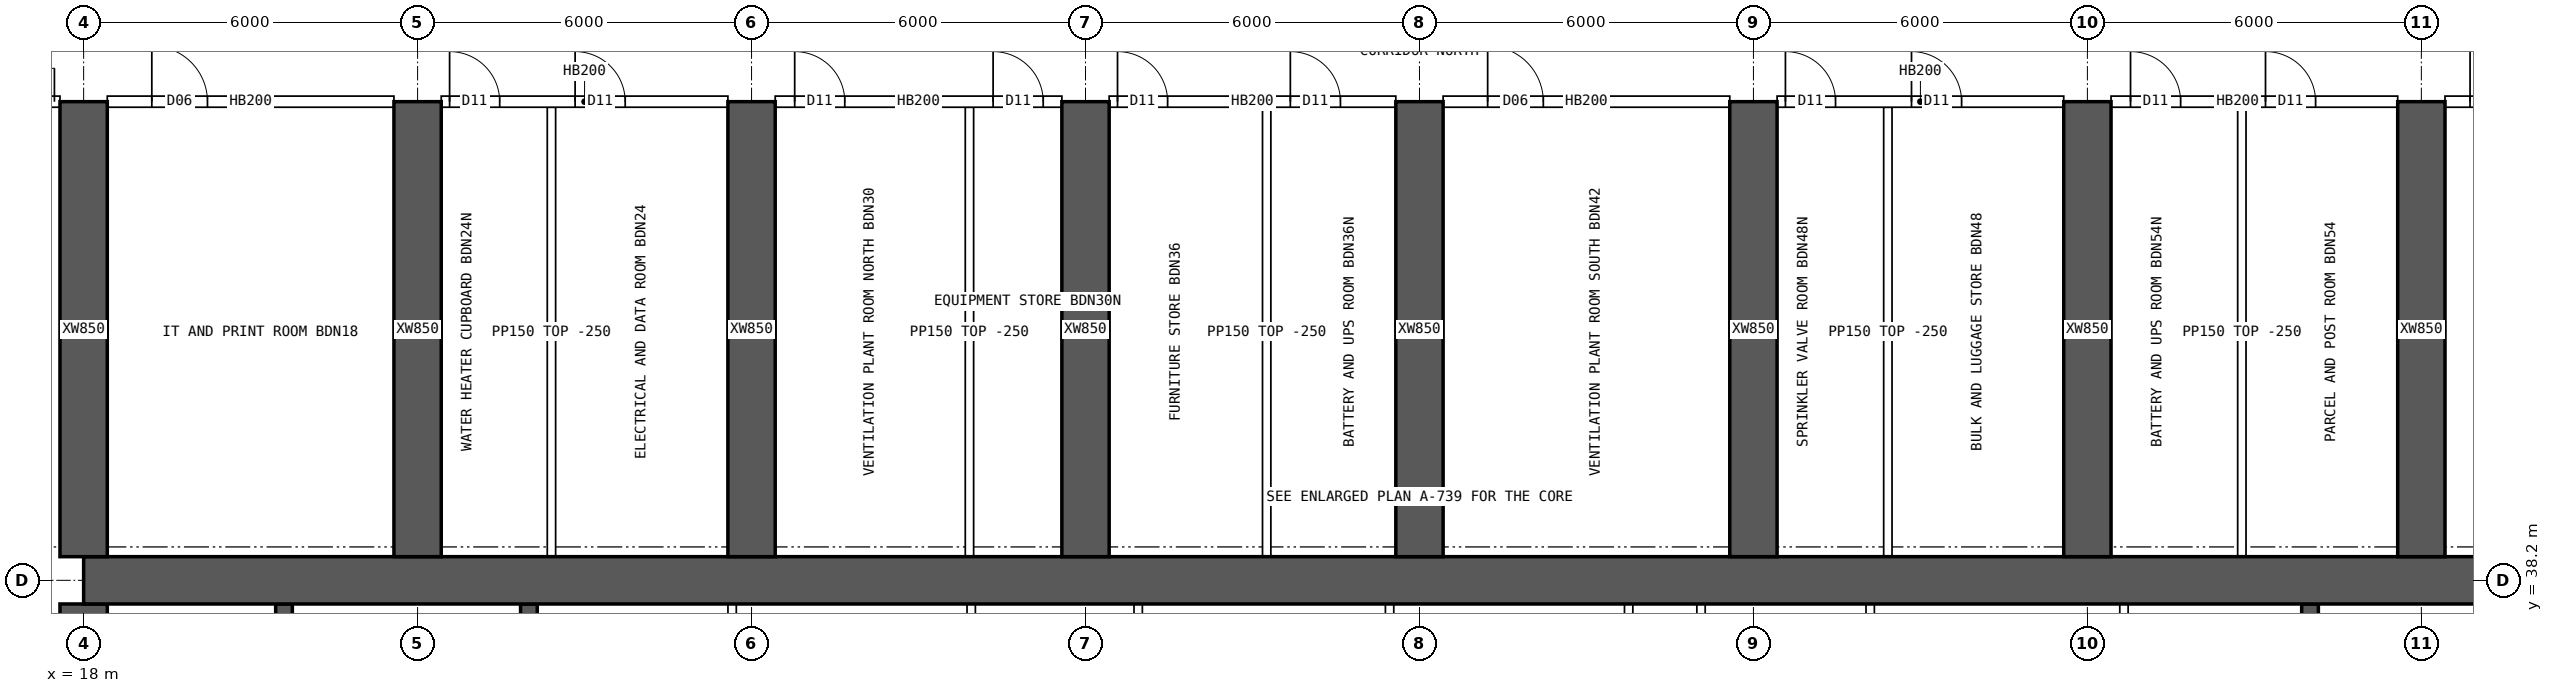
"""IFC4 building model, lengths in metres.
Left out: names, types, materials, properties, quantities, classifications, styles, units other than length and angle.
Written with IfcOpenShell. Run it as: python <this file> out.ifc"""

import sys

from ifc_helpers import new_model, si_unit, direction, frame, frame_2d, origin, place, context, subcontext, project, spatial, rectangle, extrude, element, fill, save


model = new_model("IFC4")
c1 = context("Model", 3, precision=1e-05, world=origin(), true_north=direction((0.0, 1.0)))
c2 = subcontext(c1, "Body", "Model", "MODEL_VIEW")
j1 = project(units=[si_unit("LENGTHUNIT", "METRE"), si_unit("PLANEANGLEUNIT", "RADIAN")], contexts=[c1])
p1 = place(None, origin())
s1 = spatial("IfcSite", under=j1, at=p1, CompositionType="ELEMENT")
p2 = place(p1, origin())
s2 = spatial("IfcBuilding", under=s1, at=p2, CompositionType="ELEMENT")
p3 = place(p2, frame((0.0, 0.0, 148.6)))
s3 = spatial("IfcBuildingStorey", under=s2, at=p3, CompositionType="ELEMENT", Elevation=148.6)
p4 = place(p3, frame((18.0, 38.2, 0.0), z_axis=(0.0, 0.0, 1.0), x_axis=(1.0, 0.0, 0.0)))
e1 = element("IfcWall", 1, at=p4, inside=s3, PredefinedType="SHEAR", context=c2, shape_type="SweptSolid", body=[
    extrude(rectangle(XDim=48.0, YDim=0.85, at=frame_2d((24.0, 0.0))), origin(), (0.0, 0.0, 1.0), 3.75),
])
p5 = place(p3, frame((18.0, 26.225, 0.0), z_axis=(0.0, 0.0, 1.0), x_axis=(0.0, 1.0, 0.0)))
e2 = element("IfcWall", 2, at=p5, inside=s3, PredefinedType="SHEAR", context=c2, shape_type="SweptSolid", body=[
    extrude(rectangle(XDim=11.55, YDim=0.85, at=frame_2d((5.775, 0.0))), origin(), (0.0, 0.0, 1.0), 3.75),
])
p6 = place(p5, frame((5.075, 0.0, 0.0)))
e3 = element("IfcOpeningElement", 3, at=p6, cuts=e2, PredefinedType="OPENING", context=c2, shape_type="SweptSolid", body=[
    extrude(rectangle(XDim=1.2, YDim=2.1, at=frame_2d((0.6, 1.05))), frame((0.0, 0.435, 0.0), z_axis=(0.0, -1.0, 0.0), x_axis=(1.0, 0.0, 0.0)), (0.0, 0.0, 1.0), 0.87),
])
for number, where, z_axis, x_axis in (
    (4, (21.6, 34.75, 0.0), (0.0, 0.0, 1.0), (0.0, 1.0, 0.0)),
    (5, (26.0, 34.75, 0.0), (0.0, 0.0, 1.0), (0.0, 1.0, 0.0)),
    (6, (58.0, 34.75, 0.0), (0.0, 0.0, 1.0), (0.0, 1.0, 0.0)),
):
    element("IfcWall", number, at=place(p3, frame(where, z_axis=z_axis, x_axis=x_axis)), inside=s3, PredefinedType="SHEAR", context=c2, shape_type="SweptSolid", body=[
        extrude(rectangle(XDim=3.025, YDim=0.3, at=frame_2d((1.512, 0.0))), origin(), (0.0, 0.0, 1.0), 3.75),
    ])
for number, where, z_axis, x_axis in (
    (7, (18.0, 38.625, 0.0), (0.0, 0.0, 1.0), (0.0, 1.0, 0.0)),
    (8, (24.0, 38.625, 0.0), (0.0, 0.0, 1.0), (0.0, 1.0, 0.0)),
    (9, (30.0, 38.625, 0.0), (0.0, 0.0, 1.0), (0.0, 1.0, 0.0)),
    (10, (36.0, 38.625, 0.0), (0.0, 0.0, 1.0), (0.0, 1.0, 0.0)),
    (11, (42.0, 38.625, 0.0), (0.0, 0.0, 1.0), (0.0, 1.0, 0.0)),
    (12, (48.0, 38.625, 0.0), (0.0, 0.0, 1.0), (0.0, 1.0, 0.0)),
    (13, (54.0, 38.625, 0.0), (0.0, 0.0, 1.0), (0.0, 1.0, 0.0)),
    (14, (60.0, 38.625, 0.0), (0.0, 0.0, 1.0), (0.0, 1.0, 0.0)),
):
    element("IfcWall", number, at=place(p3, frame(where, z_axis=z_axis, x_axis=x_axis)), inside=s3, PredefinedType="SHEAR", context=c2, shape_type="SweptSolid", body=[
        extrude(rectangle(XDim=8.175, YDim=0.85, at=frame_2d((4.087, 0.0))), origin(), (0.0, 0.0, 1.0), 3.75),
    ])
for number, where, z_axis, x_axis in (
    (15, (29.651, 34.75, 0.0), (0.0, 0.0, 1.0), (0.0, 1.0, 0.0)),
    (16, (33.946, 34.75, 0.0), (0.0, 0.0, 1.0), (0.0, 1.0, 0.0)),
    (17, (36.946, 34.75, 0.0), (0.0, 0.0, 1.0), (0.0, 1.0, 0.0)),
    (18, (41.463, 34.75, 0.0), (0.0, 0.0, 1.0), (0.0, 1.0, 0.0)),
    (19, (45.758, 34.75, 0.0), (0.0, 0.0, 1.0), (0.0, 1.0, 0.0)),
    (20, (47.058, 34.75, 0.0), (0.0, 0.0, 1.0), (0.0, 1.0, 0.0)),
    (21, (50.098, 34.75, 0.0), (0.0, 0.0, 1.0), (0.0, 1.0, 0.0)),
    (22, (54.657, 34.75, 0.0), (0.0, 0.0, 1.0), (0.0, 1.0, 0.0)),
):
    element("IfcWall", number, at=place(p3, frame(where, z_axis=z_axis, x_axis=x_axis)), inside=s3, PredefinedType="SOLIDWALL", context=c2, shape_type="SweptSolid", body=[
        extrude(rectangle(XDim=3.025, YDim=0.15, at=frame_2d((1.512, 0.0))), origin(), (0.0, 0.0, 1.0), 3.5),
    ])
p7 = place(p3, frame((15.6, 46.8, 0.0), z_axis=(0.0, 0.0, 1.0), x_axis=(1.0, 0.0, 0.0)))
e23 = element("IfcWall", 23, at=p7, inside=s3, PredefinedType="SOLIDWALL", context=c2, shape_type="SweptSolid", body=[
    extrude(rectangle(XDim=1.975, YDim=0.2, at=frame_2d((0.987, 0.0))), origin(), (0.0, 0.0, 1.0), 3.5),
])
p8 = place(p7, frame((0.675, 0.0, 0.0)))
e24 = element("IfcOpeningElement", 24, at=p8, cuts=e23, PredefinedType="OPENING", context=c2, shape_type="SweptSolid", body=[
    extrude(rectangle(XDim=1.2, YDim=2.1, at=frame_2d((0.6, 1.05))), frame((0.0, 0.11, 0.0), z_axis=(0.0, -1.0, 0.0), x_axis=(1.0, 0.0, 0.0)), (0.0, 0.0, 1.0), 0.22),
])
p9 = place(p3, frame((18.425, 46.8, 0.0), z_axis=(0.0, 0.0, 1.0), x_axis=(1.0, 0.0, 0.0)))
e25 = element("IfcWall", 25, at=p9, inside=s3, PredefinedType="SOLIDWALL", context=c2, shape_type="SweptSolid", body=[
    extrude(rectangle(XDim=5.15, YDim=0.2, at=frame_2d((2.575, 0.0))), origin(), (0.0, 0.0, 1.0), 3.5),
])
p10 = place(p9, frame((0.8, 0.0, 0.0)))
e26 = element("IfcOpeningElement", 26, at=p10, cuts=e25, PredefinedType="OPENING", context=c2, shape_type="SweptSolid", body=[
    extrude(rectangle(XDim=1.0, YDim=2.1, at=frame_2d((0.5, 1.05))), frame((0.0, 0.11, 0.0), z_axis=(0.0, -1.0, 0.0), x_axis=(1.0, 0.0, 0.0)), (0.0, 0.0, 1.0), 0.22),
])
p11 = place(p3, frame((24.425, 46.8, 0.0), z_axis=(0.0, 0.0, 1.0), x_axis=(1.0, 0.0, 0.0)))
e27 = element("IfcWall", 27, at=p11, inside=s3, PredefinedType="SOLIDWALL", context=c2, shape_type="SweptSolid", body=[
    extrude(rectangle(XDim=5.15, YDim=0.2, at=frame_2d((2.575, 0.0))), origin(), (0.0, 0.0, 1.0), 3.5),
])
p12 = place(p11, frame((0.15, 0.0, 0.0)))
e28 = element("IfcOpeningElement", 28, at=p12, cuts=e27, PredefinedType="OPENING", context=c2, shape_type="SweptSolid", body=[
    extrude(rectangle(XDim=0.9, YDim=2.1, at=frame_2d((0.45, 1.05))), frame((0.0, 0.11, 0.0), z_axis=(0.0, -1.0, 0.0), x_axis=(1.0, 0.0, 0.0)), (0.0, 0.0, 1.0), 0.22),
])
p13 = place(p11, frame((2.405, 0.0, 0.0)))
e29 = element("IfcOpeningElement", 29, at=p13, cuts=e27, PredefinedType="OPENING", context=c2, shape_type="SweptSolid", body=[
    extrude(rectangle(XDim=0.9, YDim=2.1, at=frame_2d((0.45, 1.05))), frame((0.0, 0.11, 0.0), z_axis=(0.0, -1.0, 0.0), x_axis=(1.0, 0.0, 0.0)), (0.0, 0.0, 1.0), 0.22),
])
p14 = place(p3, frame((30.425, 46.8, 0.0), z_axis=(0.0, 0.0, 1.0), x_axis=(1.0, 0.0, 0.0)))
e30 = element("IfcWall", 30, at=p14, inside=s3, PredefinedType="SOLIDWALL", context=c2, shape_type="SweptSolid", body=[
    extrude(rectangle(XDim=5.15, YDim=0.2, at=frame_2d((2.575, 0.0))), origin(), (0.0, 0.0, 1.0), 3.5),
])
p15 = place(p14, frame((0.35, 0.0, 0.0)))
e31 = element("IfcOpeningElement", 31, at=p15, cuts=e30, PredefinedType="OPENING", context=c2, shape_type="SweptSolid", body=[
    extrude(rectangle(XDim=0.9, YDim=2.1, at=frame_2d((0.45, 1.05))), frame((0.0, 0.11, 0.0), z_axis=(0.0, -1.0, 0.0), x_axis=(1.0, 0.0, 0.0)), (0.0, 0.0, 1.0), 0.22),
])
p16 = place(p14, frame((3.915, 0.0, 0.0)))
e32 = element("IfcOpeningElement", 32, at=p16, cuts=e30, PredefinedType="OPENING", context=c2, shape_type="SweptSolid", body=[
    extrude(rectangle(XDim=0.9, YDim=2.1, at=frame_2d((0.45, 1.05))), frame((0.0, 0.11, 0.0), z_axis=(0.0, -1.0, 0.0), x_axis=(1.0, 0.0, 0.0)), (0.0, 0.0, 1.0), 0.22),
])
p17 = place(p3, frame((36.425, 46.8, 0.0), z_axis=(0.0, 0.0, 1.0), x_axis=(1.0, 0.0, 0.0)))
e33 = element("IfcWall", 33, at=p17, inside=s3, PredefinedType="SOLIDWALL", context=c2, shape_type="SweptSolid", body=[
    extrude(rectangle(XDim=5.15, YDim=0.2, at=frame_2d((2.575, 0.0))), origin(), (0.0, 0.0, 1.0), 3.5),
])
p18 = place(p17, frame((0.15, 0.0, 0.0)))
e34 = element("IfcOpeningElement", 34, at=p18, cuts=e33, PredefinedType="OPENING", context=c2, shape_type="SweptSolid", body=[
    extrude(rectangle(XDim=0.9, YDim=2.1, at=frame_2d((0.45, 1.05))), frame((0.0, 0.11, 0.0), z_axis=(0.0, -1.0, 0.0), x_axis=(1.0, 0.0, 0.0)), (0.0, 0.0, 1.0), 0.22),
])
p19 = place(p17, frame((3.255, 0.0, 0.0)))
e35 = element("IfcOpeningElement", 35, at=p19, cuts=e33, PredefinedType="OPENING", context=c2, shape_type="SweptSolid", body=[
    extrude(rectangle(XDim=0.9, YDim=2.1, at=frame_2d((0.45, 1.05))), frame((0.0, 0.11, 0.0), z_axis=(0.0, -1.0, 0.0), x_axis=(1.0, 0.0, 0.0)), (0.0, 0.0, 1.0), 0.22),
])
p20 = place(p3, frame((42.425, 46.8, 0.0), z_axis=(0.0, 0.0, 1.0), x_axis=(1.0, 0.0, 0.0)))
e36 = element("IfcWall", 36, at=p20, inside=s3, PredefinedType="SOLIDWALL", context=c2, shape_type="SweptSolid", body=[
    extrude(rectangle(XDim=5.15, YDim=0.2, at=frame_2d((2.575, 0.0))), origin(), (0.0, 0.0, 1.0), 3.5),
])
p21 = place(p20, frame((0.8, 0.0, 0.0)))
e37 = element("IfcOpeningElement", 37, at=p21, cuts=e36, PredefinedType="OPENING", context=c2, shape_type="SweptSolid", body=[
    extrude(rectangle(XDim=1.0, YDim=2.1, at=frame_2d((0.5, 1.05))), frame((0.0, 0.11, 0.0), z_axis=(0.0, -1.0, 0.0), x_axis=(1.0, 0.0, 0.0)), (0.0, 0.0, 1.0), 0.22),
])
p22 = place(p3, frame((48.425, 46.8, 0.0), z_axis=(0.0, 0.0, 1.0), x_axis=(1.0, 0.0, 0.0)))
e38 = element("IfcWall", 38, at=p22, inside=s3, PredefinedType="SOLIDWALL", context=c2, shape_type="SweptSolid", body=[
    extrude(rectangle(XDim=5.15, YDim=0.2, at=frame_2d((2.575, 0.0))), origin(), (0.0, 0.0, 1.0), 3.5),
])
p23 = place(p22, frame((0.15, 0.0, 0.0)))
e39 = element("IfcOpeningElement", 39, at=p23, cuts=e38, PredefinedType="OPENING", context=c2, shape_type="SweptSolid", body=[
    extrude(rectangle(XDim=0.9, YDim=2.1, at=frame_2d((0.45, 1.05))), frame((0.0, 0.11, 0.0), z_axis=(0.0, -1.0, 0.0), x_axis=(1.0, 0.0, 0.0)), (0.0, 0.0, 1.0), 0.22),
])
p24 = place(p22, frame((2.415, 0.0, 0.0)))
e40 = element("IfcOpeningElement", 40, at=p24, cuts=e38, PredefinedType="OPENING", context=c2, shape_type="SweptSolid", body=[
    extrude(rectangle(XDim=0.9, YDim=2.1, at=frame_2d((0.45, 1.05))), frame((0.0, 0.11, 0.0), z_axis=(0.0, -1.0, 0.0), x_axis=(1.0, 0.0, 0.0)), (0.0, 0.0, 1.0), 0.22),
])
p25 = place(p3, frame((54.425, 46.8, 0.0), z_axis=(0.0, 0.0, 1.0), x_axis=(1.0, 0.0, 0.0)))
e41 = element("IfcWall", 41, at=p25, inside=s3, PredefinedType="SOLIDWALL", context=c2, shape_type="SweptSolid", body=[
    extrude(rectangle(XDim=5.15, YDim=0.2, at=frame_2d((2.575, 0.0))), origin(), (0.0, 0.0, 1.0), 3.5),
])
p26 = place(p25, frame((0.35, 0.0, 0.0)))
e42 = element("IfcOpeningElement", 42, at=p26, cuts=e41, PredefinedType="OPENING", context=c2, shape_type="SweptSolid", body=[
    extrude(rectangle(XDim=0.9, YDim=2.1, at=frame_2d((0.45, 1.05))), frame((0.0, 0.11, 0.0), z_axis=(0.0, -1.0, 0.0), x_axis=(1.0, 0.0, 0.0)), (0.0, 0.0, 1.0), 0.22),
])
p27 = place(p25, frame((2.775, 0.0, 0.0)))
e43 = element("IfcOpeningElement", 43, at=p27, cuts=e41, PredefinedType="OPENING", context=c2, shape_type="SweptSolid", body=[
    extrude(rectangle(XDim=0.9, YDim=2.1, at=frame_2d((0.45, 1.05))), frame((0.0, 0.11, 0.0), z_axis=(0.0, -1.0, 0.0), x_axis=(1.0, 0.0, 0.0)), (0.0, 0.0, 1.0), 0.22),
])
p28 = place(p3, frame((60.425, 46.8, 0.0), z_axis=(0.0, 0.0, 1.0), x_axis=(1.0, 0.0, 0.0)))
e44 = element("IfcWall", 44, at=p28, inside=s3, PredefinedType="SOLIDWALL", context=c2, shape_type="SweptSolid", body=[
    extrude(rectangle(XDim=5.15, YDim=0.2, at=frame_2d((2.575, 0.0))), origin(), (0.0, 0.0, 1.0), 3.5),
])
p29 = place(p28, frame((0.45, 0.0, 0.0)))
e45 = element("IfcOpeningElement", 45, at=p29, cuts=e44, PredefinedType="OPENING", context=c2, shape_type="SweptSolid", body=[
    extrude(rectangle(XDim=1.0, YDim=2.1, at=frame_2d((0.5, 1.05))), frame((0.0, 0.11, 0.0), z_axis=(0.0, -1.0, 0.0), x_axis=(1.0, 0.0, 0.0)), (0.0, 0.0, 1.0), 0.22),
])
for number, where, z_axis, x_axis in (
    (46, (26.405, 38.625, 0.0), (0.0, 0.0, 1.0), (0.0, 1.0, 0.0)),
    (47, (33.915, 38.625, 0.0), (0.0, 0.0, 1.0), (0.0, 1.0, 0.0)),
    (48, (39.255, 38.625, 0.0), (0.0, 0.0, 1.0), (0.0, 1.0, 0.0)),
    (49, (50.415, 38.625, 0.0), (0.0, 0.0, 1.0), (0.0, 1.0, 0.0)),
    (50, (56.775, 38.625, 0.0), (0.0, 0.0, 1.0), (0.0, 1.0, 0.0)),
):
    element("IfcWall", number, at=place(p3, frame(where, z_axis=z_axis, x_axis=x_axis)), inside=s3, PredefinedType="PARTITIONING", context=c2, shape_type="SweptSolid", body=[
        extrude(rectangle(XDim=8.075, YDim=0.15, at=frame_2d((4.038, 0.0))), origin(), (0.0, 0.0, 1.0), 3.5),
    ])
p30 = place(p8, origin())
e51 = element("IfcDoor", 51, at=p30, inside=s3, OperationType="DOUBLE_DOOR_SINGLE_SWING", PredefinedType="DOOR", context=c2, shape_type="SweptSolid", body=[
    extrude(rectangle(XDim=1.2, YDim=2.1, at=frame_2d((0.6, 1.05))), frame((0.0, 0.025, 0.0), z_axis=(0.0, -1.0, 0.0), x_axis=(1.0, 0.0, 0.0)), (0.0, 0.0, 1.0), 0.05),
])
fill(e24, e51)
p31 = place(p10, origin())
e52 = element("IfcDoor", 52, at=p31, inside=s3, OperationType="SINGLE_SWING_LEFT", PredefinedType="DOOR", context=c2, shape_type="SweptSolid", body=[
    extrude(rectangle(XDim=1.0, YDim=2.1, at=frame_2d((0.5, 1.05))), frame((0.0, 0.025, 0.0), z_axis=(0.0, -1.0, 0.0), x_axis=(1.0, 0.0, 0.0)), (0.0, 0.0, 1.0), 0.05),
])
fill(e26, e52)
p32 = place(p12, origin())
e53 = element("IfcDoor", 53, at=p32, inside=s3, OperationType="SINGLE_SWING_LEFT", PredefinedType="DOOR", context=c2, shape_type="SweptSolid", body=[
    extrude(rectangle(XDim=0.9, YDim=2.1, at=frame_2d((0.45, 1.05))), frame((0.0, 0.025, 0.0), z_axis=(0.0, -1.0, 0.0), x_axis=(1.0, 0.0, 0.0)), (0.0, 0.0, 1.0), 0.05),
])
fill(e28, e53)
p33 = place(p13, origin())
e54 = element("IfcDoor", 54, at=p33, inside=s3, OperationType="SINGLE_SWING_LEFT", PredefinedType="DOOR", context=c2, shape_type="SweptSolid", body=[
    extrude(rectangle(XDim=0.9, YDim=2.1, at=frame_2d((0.45, 1.05))), frame((0.0, 0.025, 0.0), z_axis=(0.0, -1.0, 0.0), x_axis=(1.0, 0.0, 0.0)), (0.0, 0.0, 1.0), 0.05),
])
fill(e29, e54)
p34 = place(p15, origin())
e55 = element("IfcDoor", 55, at=p34, inside=s3, OperationType="SINGLE_SWING_LEFT", PredefinedType="DOOR", context=c2, shape_type="SweptSolid", body=[
    extrude(rectangle(XDim=0.9, YDim=2.1, at=frame_2d((0.45, 1.05))), frame((0.0, 0.025, 0.0), z_axis=(0.0, -1.0, 0.0), x_axis=(1.0, 0.0, 0.0)), (0.0, 0.0, 1.0), 0.05),
])
fill(e31, e55)
p35 = place(p16, origin())
e56 = element("IfcDoor", 56, at=p35, inside=s3, OperationType="SINGLE_SWING_LEFT", PredefinedType="DOOR", context=c2, shape_type="SweptSolid", body=[
    extrude(rectangle(XDim=0.9, YDim=2.1, at=frame_2d((0.45, 1.05))), frame((0.0, 0.025, 0.0), z_axis=(0.0, -1.0, 0.0), x_axis=(1.0, 0.0, 0.0)), (0.0, 0.0, 1.0), 0.05),
])
fill(e32, e56)
p36 = place(p18, origin())
e57 = element("IfcDoor", 57, at=p36, inside=s3, OperationType="SINGLE_SWING_LEFT", PredefinedType="DOOR", context=c2, shape_type="SweptSolid", body=[
    extrude(rectangle(XDim=0.9, YDim=2.1, at=frame_2d((0.45, 1.05))), frame((0.0, 0.025, 0.0), z_axis=(0.0, -1.0, 0.0), x_axis=(1.0, 0.0, 0.0)), (0.0, 0.0, 1.0), 0.05),
])
fill(e34, e57)
p37 = place(p19, origin())
e58 = element("IfcDoor", 58, at=p37, inside=s3, OperationType="SINGLE_SWING_LEFT", PredefinedType="DOOR", context=c2, shape_type="SweptSolid", body=[
    extrude(rectangle(XDim=0.9, YDim=2.1, at=frame_2d((0.45, 1.05))), frame((0.0, 0.025, 0.0), z_axis=(0.0, -1.0, 0.0), x_axis=(1.0, 0.0, 0.0)), (0.0, 0.0, 1.0), 0.05),
])
fill(e35, e58)
p38 = place(p21, origin())
e59 = element("IfcDoor", 59, at=p38, inside=s3, OperationType="SINGLE_SWING_LEFT", PredefinedType="DOOR", context=c2, shape_type="SweptSolid", body=[
    extrude(rectangle(XDim=1.0, YDim=2.1, at=frame_2d((0.5, 1.05))), frame((0.0, 0.025, 0.0), z_axis=(0.0, -1.0, 0.0), x_axis=(1.0, 0.0, 0.0)), (0.0, 0.0, 1.0), 0.05),
])
fill(e37, e59)
p39 = place(p23, origin())
e60 = element("IfcDoor", 60, at=p39, inside=s3, OperationType="SINGLE_SWING_LEFT", PredefinedType="DOOR", context=c2, shape_type="SweptSolid", body=[
    extrude(rectangle(XDim=0.9, YDim=2.1, at=frame_2d((0.45, 1.05))), frame((0.0, 0.025, 0.0), z_axis=(0.0, -1.0, 0.0), x_axis=(1.0, 0.0, 0.0)), (0.0, 0.0, 1.0), 0.05),
])
fill(e39, e60)
p40 = place(p24, origin())
e61 = element("IfcDoor", 61, at=p40, inside=s3, OperationType="SINGLE_SWING_LEFT", PredefinedType="DOOR", context=c2, shape_type="SweptSolid", body=[
    extrude(rectangle(XDim=0.9, YDim=2.1, at=frame_2d((0.45, 1.05))), frame((0.0, 0.025, 0.0), z_axis=(0.0, -1.0, 0.0), x_axis=(1.0, 0.0, 0.0)), (0.0, 0.0, 1.0), 0.05),
])
fill(e40, e61)
p41 = place(p26, origin())
e62 = element("IfcDoor", 62, at=p41, inside=s3, OperationType="SINGLE_SWING_LEFT", PredefinedType="DOOR", context=c2, shape_type="SweptSolid", body=[
    extrude(rectangle(XDim=0.9, YDim=2.1, at=frame_2d((0.45, 1.05))), frame((0.0, 0.025, 0.0), z_axis=(0.0, -1.0, 0.0), x_axis=(1.0, 0.0, 0.0)), (0.0, 0.0, 1.0), 0.05),
])
fill(e42, e62)
p42 = place(p27, origin())
e63 = element("IfcDoor", 63, at=p42, inside=s3, OperationType="SINGLE_SWING_LEFT", PredefinedType="DOOR", context=c2, shape_type="SweptSolid", body=[
    extrude(rectangle(XDim=0.9, YDim=2.1, at=frame_2d((0.45, 1.05))), frame((0.0, 0.025, 0.0), z_axis=(0.0, -1.0, 0.0), x_axis=(1.0, 0.0, 0.0)), (0.0, 0.0, 1.0), 0.05),
])
fill(e43, e63)
p43 = place(p29, origin())
e64 = element("IfcDoor", 64, at=p43, inside=s3, OperationType="SINGLE_SWING_LEFT", PredefinedType="DOOR", context=c2, shape_type="SweptSolid", body=[
    extrude(rectangle(XDim=1.0, YDim=2.1, at=frame_2d((0.5, 1.05))), frame((0.0, 0.025, 0.0), z_axis=(0.0, -1.0, 0.0), x_axis=(1.0, 0.0, 0.0)), (0.0, 0.0, 1.0), 0.05),
])
fill(e45, e64)
save(model, sys.argv[1])
